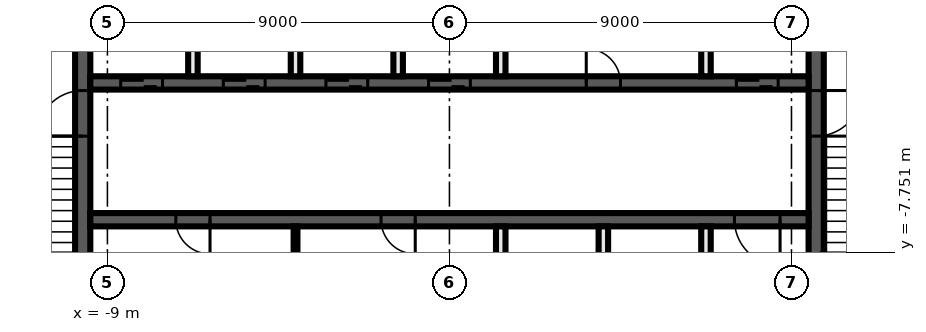
"""IFC4 building model, lengths in metres.
Left out: names, types, materials, properties, quantities, classifications, styles, units other than length and angle.
Written with IfcOpenShell. Run it as: python <this file> out.ifc"""

import sys

from ifc_helpers import new_model, si_unit, direction, frame, frame_2d, origin, place, context, subcontext, project, spatial, rectangle, extrude, element, fill, save


model = new_model("IFC4")
c1 = context("Model", 3, precision=1e-05, world=origin(), true_north=direction((0.0, 1.0)))
c2 = subcontext(c1, "Body", "Model", "MODEL_VIEW")
j1 = project(units=[si_unit("LENGTHUNIT", "METRE"), si_unit("PLANEANGLEUNIT", "RADIAN")], contexts=[c1])
p1 = place(None, origin())
s1 = spatial("IfcSite", under=j1, at=p1, CompositionType="ELEMENT")
p2 = place(p1, origin())
s2 = spatial("IfcBuilding", under=s1, at=p2, CompositionType="ELEMENT")
p3 = place(p2, frame((0.0, 0.0, 270.6)))
s3 = spatial("IfcBuildingStorey", under=s2, at=p3, CompositionType="ELEMENT", Elevation=270.6)
p4 = place(p3, frame((9.65, -2.3, 0.0), z_axis=(0.0, 0.0, 1.0), x_axis=(0.0, -1.0, 0.0)))
e1 = element("IfcWall", 1, at=p4, inside=s3, PredefinedType="SHEAR", context=c2, shape_type="SweptSolid", body=[
    extrude(rectangle(XDim=7.5, YDim=0.4, at=frame_2d((3.75, 0.0))), origin(), (0.0, 0.0, 1.0), 3.82),
])
p5 = place(p4, frame((1.2, 0.0, 0.0)))
e2 = element("IfcOpeningElement", 2, at=p5, cuts=e1, PredefinedType="OPENING", context=c2, shape_type="SweptSolid", body=[
    extrude(rectangle(XDim=1.2, YDim=2.1, at=frame_2d((0.6, 1.05))), frame((0.0, 0.21, 0.0), z_axis=(0.0, -1.0, 0.0), x_axis=(1.0, 0.0, 0.0)), (0.0, 0.0, 1.0), 0.42),
])
p6 = place(p3, frame((-9.65, -9.8, 0.0), z_axis=(0.0, 0.0, 1.0), x_axis=(0.0, 1.0, 0.0)))
e3 = element("IfcWall", 3, at=p6, inside=s3, PredefinedType="SHEAR", context=c2, shape_type="SweptSolid", body=[
    extrude(rectangle(XDim=7.5, YDim=0.4, at=frame_2d((3.75, 0.0))), origin(), (0.0, 0.0, 1.0), 3.82),
])
p7 = place(p6, frame((5.1, 0.0, 0.0)))
e4 = element("IfcOpeningElement", 4, at=p7, cuts=e3, PredefinedType="OPENING", context=c2, shape_type="SweptSolid", body=[
    extrude(rectangle(XDim=1.2, YDim=2.1, at=frame_2d((0.6, 1.05))), frame((0.0, 0.21, 0.0), z_axis=(0.0, -1.0, 0.0), x_axis=(1.0, 0.0, 0.0)), (0.0, 0.0, 1.0), 0.42),
])
p8 = place(p3, frame((-9.45, -3.3, 0.0), z_axis=(0.0, 0.0, 1.0), x_axis=(1.0, 0.0, 0.0)))
e5 = element("IfcWall", 5, at=p8, inside=s3, PredefinedType="SHEAR", context=c2, shape_type="SweptSolid", body=[
    extrude(rectangle(XDim=18.9, YDim=0.35, at=frame_2d((9.45, 0.0))), origin(), (0.0, 0.0, 1.0), 3.82),
])
p9 = place(p8, frame((0.8, 0.0, 0.0)))
e6 = element("IfcOpeningElement", 6, at=p9, cuts=e5, PredefinedType="OPENING", context=c2, shape_type="SweptSolid", body=[
    extrude(rectangle(XDim=1.1, YDim=2.1, at=frame_2d((0.55, 1.05))), frame((0.0, 0.185, 0.0), z_axis=(0.0, -1.0, 0.0), x_axis=(1.0, 0.0, 0.0)), (0.0, 0.0, 1.0), 0.37),
])
p10 = place(p8, frame((3.5, 0.0, 0.0)))
e7 = element("IfcOpeningElement", 7, at=p10, cuts=e5, PredefinedType="OPENING", context=c2, shape_type="SweptSolid", body=[
    extrude(rectangle(XDim=1.1, YDim=2.1, at=frame_2d((0.55, 1.05))), frame((0.0, 0.185, 0.0), z_axis=(0.0, -1.0, 0.0), x_axis=(1.0, 0.0, 0.0)), (0.0, 0.0, 1.0), 0.37),
])
p11 = place(p8, frame((6.2, 0.0, 0.0)))
e8 = element("IfcOpeningElement", 8, at=p11, cuts=e5, PredefinedType="OPENING", context=c2, shape_type="SweptSolid", body=[
    extrude(rectangle(XDim=1.1, YDim=2.1, at=frame_2d((0.55, 1.05))), frame((0.0, 0.185, 0.0), z_axis=(0.0, -1.0, 0.0), x_axis=(1.0, 0.0, 0.0)), (0.0, 0.0, 1.0), 0.37),
])
p12 = place(p8, frame((8.9, 0.0, 0.0)))
e9 = element("IfcOpeningElement", 9, at=p12, cuts=e5, PredefinedType="OPENING", context=c2, shape_type="SweptSolid", body=[
    extrude(rectangle(XDim=1.1, YDim=2.1, at=frame_2d((0.55, 1.05))), frame((0.0, 0.185, 0.0), z_axis=(0.0, -1.0, 0.0), x_axis=(1.0, 0.0, 0.0)), (0.0, 0.0, 1.0), 0.37),
])
p13 = place(p8, frame((17.0, 0.0, 0.0)))
e10 = element("IfcOpeningElement", 10, at=p13, cuts=e5, PredefinedType="OPENING", context=c2, shape_type="SweptSolid", body=[
    extrude(rectangle(XDim=1.1, YDim=2.1, at=frame_2d((0.55, 1.05))), frame((0.0, 0.185, 0.0), z_axis=(0.0, -1.0, 0.0), x_axis=(1.0, 0.0, 0.0)), (0.0, 0.0, 1.0), 0.37),
])
p14 = place(p8, frame((13.05, 0.0, 0.0)))
e11 = element("IfcOpeningElement", 11, at=p14, cuts=e5, PredefinedType="OPENING", context=c2, shape_type="SweptSolid", body=[
    extrude(rectangle(XDim=0.9, YDim=2.1, at=frame_2d((0.45, 1.05))), frame((0.0, 0.185, 0.0), z_axis=(0.0, -1.0, 0.0), x_axis=(1.0, 0.0, 0.0)), (0.0, 0.0, 1.0), 0.37),
])
p15 = place(p3, frame((9.45, -6.9, 0.0), z_axis=(0.0, 0.0, 1.0), x_axis=(-1.0, 0.0, 0.0)))
e12 = element("IfcWall", 12, at=p15, inside=s3, PredefinedType="SHEAR", context=c2, shape_type="SweptSolid", body=[
    extrude(rectangle(XDim=18.9, YDim=0.35, at=frame_2d((9.45, 0.0))), origin(), (0.0, 0.0, 1.0), 3.82),
])
p16 = place(p15, frame((0.75, 0.0, 0.0)))
e13 = element("IfcOpeningElement", 13, at=p16, cuts=e12, PredefinedType="OPENING", context=c2, shape_type="SweptSolid", body=[
    extrude(rectangle(XDim=1.2, YDim=2.1, at=frame_2d((0.6, 1.05))), frame((0.0, 0.185, 0.0), z_axis=(0.0, -1.0, 0.0), x_axis=(1.0, 0.0, 0.0)), (0.0, 0.0, 1.0), 0.37),
])
p17 = place(p15, frame((15.75, 0.0, 0.0)))
e14 = element("IfcOpeningElement", 14, at=p17, cuts=e12, PredefinedType="OPENING", context=c2, shape_type="SweptSolid", body=[
    extrude(rectangle(XDim=0.9, YDim=2.1, at=frame_2d((0.45, 1.05))), frame((0.0, 0.185, 0.0), z_axis=(0.0, -1.0, 0.0), x_axis=(1.0, 0.0, 0.0)), (0.0, 0.0, 1.0), 0.37),
])
p18 = place(p15, frame((10.35, 0.0, 0.0)))
e15 = element("IfcOpeningElement", 15, at=p18, cuts=e12, PredefinedType="OPENING", context=c2, shape_type="SweptSolid", body=[
    extrude(rectangle(XDim=0.9, YDim=2.1, at=frame_2d((0.45, 1.05))), frame((0.0, 0.185, 0.0), z_axis=(0.0, -1.0, 0.0), x_axis=(1.0, 0.0, 0.0)), (0.0, 0.0, 1.0), 0.37),
])
for number, where, z_axis, x_axis in (
    (16, (6.75, -9.8, 0.0), (0.0, 0.0, 1.0), (0.0, 1.0, 0.0)),
    (17, (6.75, -3.125, 0.0), (0.0, 0.0, 1.0), (0.0, 1.0, 0.0)),
    (18, (4.05, -9.8, 0.0), (0.0, 0.0, 1.0), (0.0, 1.0, 0.0)),
    (19, (1.35, -9.8, 0.0), (0.0, 0.0, 1.0), (0.0, 1.0, 0.0)),
    (20, (1.35, -3.125, 0.0), (0.0, 0.0, 1.0), (0.0, 1.0, 0.0)),
    (21, (-1.35, -3.125, 0.0), (0.0, 0.0, 1.0), (0.0, 1.0, 0.0)),
):
    element("IfcWall", number, at=place(p3, frame(where, z_axis=z_axis, x_axis=x_axis)), inside=s3, PredefinedType="SOLIDWALL", context=c2, shape_type="SweptSolid", body=[
        extrude(rectangle(XDim=2.725, YDim=0.25, at=frame_2d((1.363, 0.0))), origin(), (0.0, 0.0, 1.0), 3.82),
    ])
p19 = place(p3, frame((-4.05, -9.8, 0.0), z_axis=(0.0, 0.0, 1.0), x_axis=(0.0, 1.0, 0.0)))
e22 = element("IfcWall", 22, at=p19, inside=s3, PredefinedType="PARTITIONING", context=c2, shape_type="SweptSolid", body=[
    extrude(rectangle(XDim=2.725, YDim=0.1, at=frame_2d((1.363, 0.0))), origin(), (0.0, 0.0, 1.0), 3.82),
])
for number, where, z_axis, x_axis in (
    (23, (-4.05, -3.125, 0.0), (0.0, 0.0, 1.0), (0.0, 1.0, 0.0)),
    (24, (-6.75, -3.125, 0.0), (0.0, 0.0, 1.0), (0.0, 1.0, 0.0)),
):
    element("IfcWall", number, at=place(p3, frame(where, z_axis=z_axis, x_axis=x_axis)), inside=s3, PredefinedType="SOLIDWALL", context=c2, shape_type="SweptSolid", body=[
        extrude(rectangle(XDim=2.725, YDim=0.25, at=frame_2d((1.363, 0.0))), origin(), (0.0, 0.0, 1.0), 3.82),
    ])
p20 = place(p9, origin())
e25 = element("IfcDoor", 25, at=p20, inside=s3, OperationType="DOUBLE_DOOR_SLIDING", PredefinedType="DOOR", context=c2, shape_type="SweptSolid", body=[
    extrude(rectangle(XDim=1.1, YDim=2.1, at=frame_2d((0.55, 1.05))), frame((0.0, 0.025, 0.0), z_axis=(0.0, -1.0, 0.0), x_axis=(1.0, 0.0, 0.0)), (0.0, 0.0, 1.0), 0.05),
])
fill(e6, e25)
p21 = place(p10, origin())
e26 = element("IfcDoor", 26, at=p21, inside=s3, OperationType="DOUBLE_DOOR_SLIDING", PredefinedType="DOOR", context=c2, shape_type="SweptSolid", body=[
    extrude(rectangle(XDim=1.1, YDim=2.1, at=frame_2d((0.55, 1.05))), frame((0.0, 0.025, 0.0), z_axis=(0.0, -1.0, 0.0), x_axis=(1.0, 0.0, 0.0)), (0.0, 0.0, 1.0), 0.05),
])
fill(e7, e26)
p22 = place(p11, origin())
e27 = element("IfcDoor", 27, at=p22, inside=s3, OperationType="DOUBLE_DOOR_SLIDING", PredefinedType="DOOR", context=c2, shape_type="SweptSolid", body=[
    extrude(rectangle(XDim=1.1, YDim=2.1, at=frame_2d((0.55, 1.05))), frame((0.0, 0.025, 0.0), z_axis=(0.0, -1.0, 0.0), x_axis=(1.0, 0.0, 0.0)), (0.0, 0.0, 1.0), 0.05),
])
fill(e8, e27)
p23 = place(p12, origin())
e28 = element("IfcDoor", 28, at=p23, inside=s3, OperationType="DOUBLE_DOOR_SLIDING", PredefinedType="DOOR", context=c2, shape_type="SweptSolid", body=[
    extrude(rectangle(XDim=1.1, YDim=2.1, at=frame_2d((0.55, 1.05))), frame((0.0, 0.025, 0.0), z_axis=(0.0, -1.0, 0.0), x_axis=(1.0, 0.0, 0.0)), (0.0, 0.0, 1.0), 0.05),
])
fill(e9, e28)
p24 = place(p13, origin())
e29 = element("IfcDoor", 29, at=p24, inside=s3, OperationType="DOUBLE_DOOR_SLIDING", PredefinedType="DOOR", context=c2, shape_type="SweptSolid", body=[
    extrude(rectangle(XDim=1.1, YDim=2.1, at=frame_2d((0.55, 1.05))), frame((0.0, 0.025, 0.0), z_axis=(0.0, -1.0, 0.0), x_axis=(1.0, 0.0, 0.0)), (0.0, 0.0, 1.0), 0.05),
])
fill(e10, e29)
p25 = place(p16, origin())
e30 = element("IfcDoor", 30, at=p25, inside=s3, OperationType="SINGLE_SWING_LEFT", PredefinedType="DOOR", context=c2, shape_type="SweptSolid", body=[
    extrude(rectangle(XDim=1.2, YDim=2.1, at=frame_2d((0.6, 1.05))), frame((0.0, 0.025, 0.0), z_axis=(0.0, -1.0, 0.0), x_axis=(1.0, 0.0, 0.0)), (0.0, 0.0, 1.0), 0.05),
])
fill(e13, e30)
p26 = place(p14, origin())
e31 = element("IfcDoor", 31, at=p26, inside=s3, OperationType="SINGLE_SWING_RIGHT", PredefinedType="DOOR", context=c2, shape_type="SweptSolid", body=[
    extrude(rectangle(XDim=0.9, YDim=2.1, at=frame_2d((0.45, 1.05))), frame((0.0, 0.025, 0.0), z_axis=(0.0, -1.0, 0.0), x_axis=(1.0, 0.0, 0.0)), (0.0, 0.0, 1.0), 0.05),
])
fill(e11, e31)
p27 = place(p17, origin())
e32 = element("IfcDoor", 32, at=p27, inside=s3, OperationType="SINGLE_SWING_LEFT", PredefinedType="DOOR", context=c2, shape_type="SweptSolid", body=[
    extrude(rectangle(XDim=0.9, YDim=2.1, at=frame_2d((0.45, 1.05))), frame((0.0, 0.025, 0.0), z_axis=(0.0, -1.0, 0.0), x_axis=(1.0, 0.0, 0.0)), (0.0, 0.0, 1.0), 0.05),
])
fill(e14, e32)
p28 = place(p18, origin())
e33 = element("IfcDoor", 33, at=p28, inside=s3, OperationType="SINGLE_SWING_RIGHT", PredefinedType="DOOR", context=c2, shape_type="SweptSolid", body=[
    extrude(rectangle(XDim=0.9, YDim=2.1, at=frame_2d((0.45, 1.05))), frame((0.0, 0.025, 0.0), z_axis=(0.0, -1.0, 0.0), x_axis=(1.0, 0.0, 0.0)), (0.0, 0.0, 1.0), 0.05),
])
fill(e15, e33)
p29 = place(p5, origin())
e34 = element("IfcDoor", 34, at=p29, inside=s3, OperationType="SINGLE_SWING_RIGHT", PredefinedType="DOOR", context=c2, shape_type="SweptSolid", body=[
    extrude(rectangle(XDim=1.2, YDim=2.1, at=frame_2d((0.6, 1.05))), frame((0.0, 0.025, 0.0), z_axis=(0.0, -1.0, 0.0), x_axis=(1.0, 0.0, 0.0)), (0.0, 0.0, 1.0), 0.05),
])
fill(e2, e34)
p30 = place(p7, origin())
e35 = element("IfcDoor", 35, at=p30, inside=s3, OperationType="SINGLE_SWING_LEFT", PredefinedType="DOOR", context=c2, shape_type="SweptSolid", body=[
    extrude(rectangle(XDim=1.2, YDim=2.1, at=frame_2d((0.6, 1.05))), frame((0.0, 0.025, 0.0), z_axis=(0.0, -1.0, 0.0), x_axis=(1.0, 0.0, 0.0)), (0.0, 0.0, 1.0), 0.05),
])
fill(e4, e35)
save(model, sys.argv[1])
